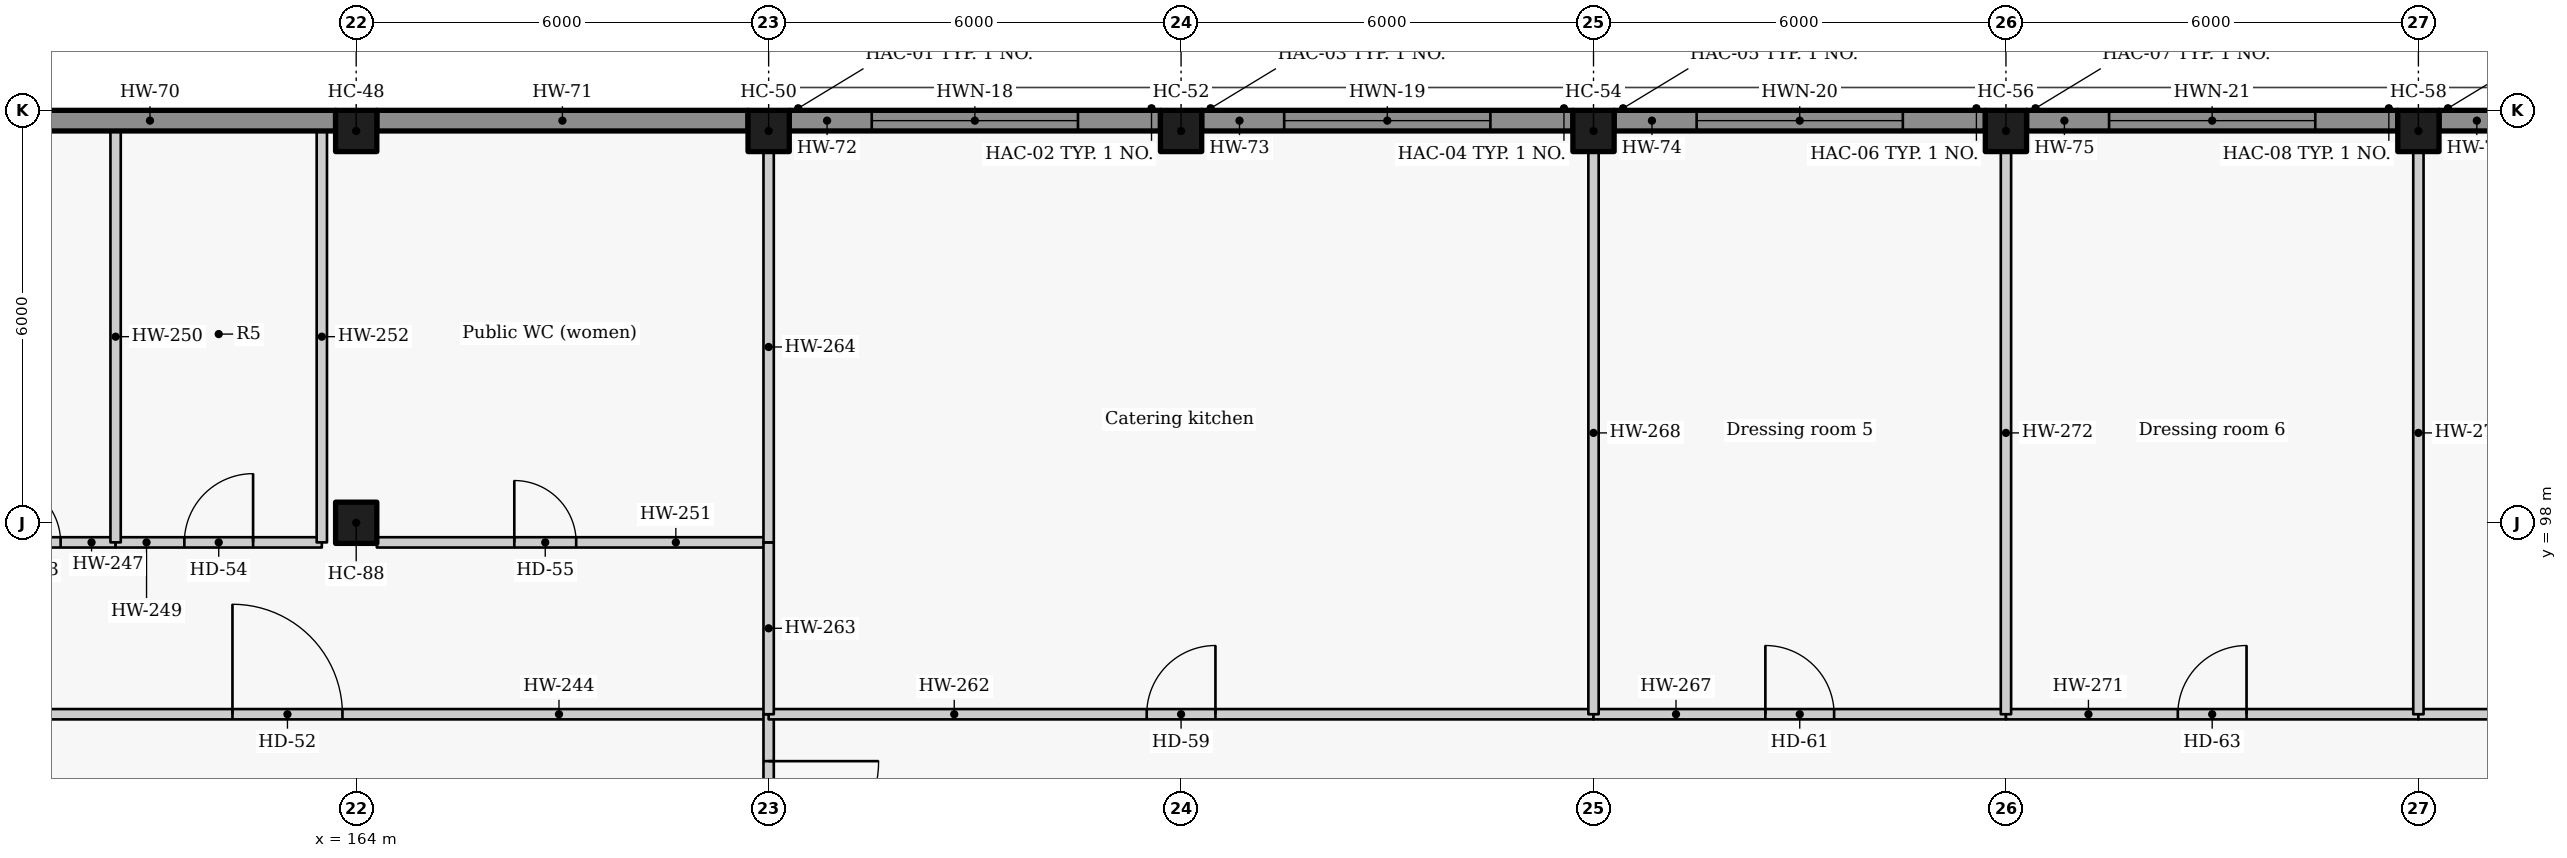
"""IFC4 building model, lengths in metres.
Left out: names, types, materials, properties, quantities, classifications, styles, units other than length and angle.
Written with IfcOpenShell. Run it as: python <this file> out.ifc"""

import sys

from ifc_helpers import new_model, si_unit, direction, frame, frame_2d, origin, origin_2d, place, context, subcontext, project, spatial, rectangle, extrude, element, fill, save


model = new_model("IFC4")
c1 = context("Model", 3, precision=1e-05, world=origin(), true_north=direction((0.0, 1.0)))
c2 = subcontext(c1, "Body", "Model", "MODEL_VIEW")
j1 = project(units=[si_unit("LENGTHUNIT", "METRE"), si_unit("PLANEANGLEUNIT", "RADIAN")], contexts=[c1])
p1 = place(None, origin())
s1 = spatial("IfcSite", under=j1, at=p1, CompositionType="ELEMENT")
p2 = place(p1, origin())
s2 = spatial("IfcBuilding", under=s1, at=p2, CompositionType="ELEMENT")
p3 = place(p2, frame((0.0, 0.0, 6.6)))
s3 = spatial("IfcBuildingStorey", under=s2, at=p3, CompositionType="ELEMENT", Elevation=6.6)
for number, where, z_axis, x_axis in (
    (1, (164.0, 103.7, 0.0), (0.0, 0.0, 1.0), (1.0, 0.0, 0.0)),
    (2, (170.0, 103.7, 0.0), (0.0, 0.0, 1.0), (1.0, 0.0, 0.0)),
    (3, (176.0, 103.7, 0.0), (0.0, 0.0, 1.0), (1.0, 0.0, 0.0)),
    (4, (182.0, 103.7, 0.0), (0.0, 0.0, 1.0), (1.0, 0.0, 0.0)),
    (5, (188.0, 103.7, 0.0), (0.0, 0.0, 1.0), (1.0, 0.0, 0.0)),
    (6, (194.0, 103.7, 0.0), (0.0, 0.0, 1.0), (1.0, 0.0, 0.0)),
    (7, (164.0, 98.0, 0.0), (0.0, 0.0, 1.0), (1.0, 0.0, 0.0)),
):
    element("IfcColumn", number, at=place(p3, frame(where, z_axis=z_axis, x_axis=x_axis)), inside=s3, PredefinedType="COLUMN", context=c2, shape_type="SweptSolid", body=[
        extrude(rectangle(XDim=0.6, YDim=0.6, at=origin_2d()), origin(), (0.0, 0.0, 1.0), 4.8),
    ])
for number, where, z_axis, x_axis in (
    (8, (158.3, 103.85, 0.0), (0.0, 0.0, 1.0), (1.0, 0.0, 0.0)),
    (9, (164.3, 103.85, 0.0), (0.0, 0.0, 1.0), (1.0, 0.0, 0.0)),
):
    element("IfcWall", number, at=place(p3, frame(where, z_axis=z_axis, x_axis=x_axis)), inside=s3, PredefinedType="SOLIDWALL", context=c2, shape_type="SweptSolid", body=[
        extrude(rectangle(XDim=5.4, YDim=0.3, at=frame_2d((2.7, 0.0))), origin(), (0.0, 0.0, 1.0), 4.8),
    ])
p4 = place(p3, frame((170.3, 103.85, 0.0), z_axis=(0.0, 0.0, 1.0), x_axis=(1.0, 0.0, 0.0)))
e10 = element("IfcWall", 10, at=p4, inside=s3, PredefinedType="SOLIDWALL", context=c2, shape_type="SweptSolid", body=[
    extrude(rectangle(XDim=5.4, YDim=0.3, at=frame_2d((2.7, 0.0))), origin(), (0.0, 0.0, 1.0), 4.8),
])
p5 = place(p4, frame((1.2, 0.0, 0.9)))
e11 = element("IfcOpeningElement", 11, at=p5, cuts=e10, PredefinedType="OPENING", context=c2, shape_type="SweptSolid", body=[
    extrude(rectangle(XDim=3.0, YDim=1.8, at=frame_2d((1.5, 0.9))), frame((0.0, 0.16, 0.0), z_axis=(0.0, -1.0, 0.0), x_axis=(1.0, 0.0, 0.0)), (0.0, 0.0, 1.0), 0.32),
])
p6 = place(p3, frame((176.3, 103.85, 0.0), z_axis=(0.0, 0.0, 1.0), x_axis=(1.0, 0.0, 0.0)))
e12 = element("IfcWall", 12, at=p6, inside=s3, PredefinedType="SOLIDWALL", context=c2, shape_type="SweptSolid", body=[
    extrude(rectangle(XDim=5.4, YDim=0.3, at=frame_2d((2.7, 0.0))), origin(), (0.0, 0.0, 1.0), 4.8),
])
p7 = place(p6, frame((1.2, 0.0, 0.9)))
e13 = element("IfcOpeningElement", 13, at=p7, cuts=e12, PredefinedType="OPENING", context=c2, shape_type="SweptSolid", body=[
    extrude(rectangle(XDim=3.0, YDim=1.8, at=frame_2d((1.5, 0.9))), frame((0.0, 0.16, 0.0), z_axis=(0.0, -1.0, 0.0), x_axis=(1.0, 0.0, 0.0)), (0.0, 0.0, 1.0), 0.32),
])
p8 = place(p3, frame((182.3, 103.85, 0.0), z_axis=(0.0, 0.0, 1.0), x_axis=(1.0, 0.0, 0.0)))
e14 = element("IfcWall", 14, at=p8, inside=s3, PredefinedType="SOLIDWALL", context=c2, shape_type="SweptSolid", body=[
    extrude(rectangle(XDim=5.4, YDim=0.3, at=frame_2d((2.7, 0.0))), origin(), (0.0, 0.0, 1.0), 4.8),
])
p9 = place(p8, frame((1.2, 0.0, 0.9)))
e15 = element("IfcOpeningElement", 15, at=p9, cuts=e14, PredefinedType="OPENING", context=c2, shape_type="SweptSolid", body=[
    extrude(rectangle(XDim=3.0, YDim=1.8, at=frame_2d((1.5, 0.9))), frame((0.0, 0.16, 0.0), z_axis=(0.0, -1.0, 0.0), x_axis=(1.0, 0.0, 0.0)), (0.0, 0.0, 1.0), 0.32),
])
p10 = place(p3, frame((188.3, 103.85, 0.0), z_axis=(0.0, 0.0, 1.0), x_axis=(1.0, 0.0, 0.0)))
e16 = element("IfcWall", 16, at=p10, inside=s3, PredefinedType="SOLIDWALL", context=c2, shape_type="SweptSolid", body=[
    extrude(rectangle(XDim=5.4, YDim=0.3, at=frame_2d((2.7, 0.0))), origin(), (0.0, 0.0, 1.0), 4.8),
])
p11 = place(p10, frame((1.2, 0.0, 0.9)))
e17 = element("IfcOpeningElement", 17, at=p11, cuts=e16, PredefinedType="OPENING", context=c2, shape_type="SweptSolid", body=[
    extrude(rectangle(XDim=3.0, YDim=1.8, at=frame_2d((1.5, 0.9))), frame((0.0, 0.16, 0.0), z_axis=(0.0, -1.0, 0.0), x_axis=(1.0, 0.0, 0.0)), (0.0, 0.0, 1.0), 0.32),
])
p12 = place(p3, frame((194.3, 103.85, 0.0), z_axis=(0.0, 0.0, 1.0), x_axis=(1.0, 0.0, 0.0)))
e18 = element("IfcWall", 18, at=p12, inside=s3, PredefinedType="SOLIDWALL", context=c2, shape_type="SweptSolid", body=[
    extrude(rectangle(XDim=5.4, YDim=0.3, at=frame_2d((2.7, 0.0))), origin(), (0.0, 0.0, 1.0), 4.8),
])
p13 = place(p12, frame((1.2, 0.0, 0.9)))
e19 = element("IfcOpeningElement", 19, at=p13, cuts=e18, PredefinedType="OPENING", context=c2, shape_type="SweptSolid", body=[
    extrude(rectangle(XDim=3.0, YDim=1.8, at=frame_2d((1.5, 0.9))), frame((0.0, 0.16, 0.0), z_axis=(0.0, -1.0, 0.0), x_axis=(1.0, 0.0, 0.0)), (0.0, 0.0, 1.0), 0.32),
])
p14 = place(p3, frame((156.175, 95.215, 0.0), z_axis=(0.0, 0.0, 1.0), x_axis=(1.0, 0.0, 0.0)))
e20 = element("IfcWall", 20, at=p14, inside=s3, PredefinedType="PARTITIONING", context=c2, shape_type="SweptSolid", body=[
    extrude(rectangle(XDim=13.825, YDim=0.15, at=frame_2d((6.913, 0.0))), origin(), (0.0, 0.0, 1.0), 4.45),
])
p15 = place(p14, frame((6.025, 0.0, 0.0)))
e21 = element("IfcOpeningElement", 21, at=p15, cuts=e20, PredefinedType="OPENING", context=c2, shape_type="SweptSolid", body=[
    extrude(rectangle(XDim=1.6, YDim=2.1, at=frame_2d((0.8, 1.05))), frame((0.0, 0.085, 0.0), z_axis=(0.0, -1.0, 0.0), x_axis=(1.0, 0.0, 0.0)), (0.0, 0.0, 1.0), 0.17),
])
p16 = place(p3, frame((158.3, 97.715, 0.0), z_axis=(0.0, 0.0, 1.0), x_axis=(1.0, 0.0, 0.0)))
e22 = element("IfcWall", 22, at=p16, inside=s3, PredefinedType="PLUMBINGWALL", context=c2, shape_type="SweptSolid", body=[
    extrude(rectangle(XDim=2.2, YDim=0.15, at=frame_2d((1.1, 0.0))), origin(), (0.0, 0.0, 1.0), 4.45),
])
p17 = place(p16, frame((0.5, 0.0, 0.0)))
e23 = element("IfcOpeningElement", 23, at=p17, cuts=e22, PredefinedType="OPENING", context=c2, shape_type="SweptSolid", body=[
    extrude(rectangle(XDim=0.9, YDim=2.1, at=frame_2d((0.45, 1.05))), frame((0.0, 0.085, 0.0), z_axis=(0.0, -1.0, 0.0), x_axis=(1.0, 0.0, 0.0)), (0.0, 0.0, 1.0), 0.17),
])
p18 = place(p3, frame((160.5, 97.715, 0.0), z_axis=(0.0, 0.0, 1.0), x_axis=(1.0, 0.0, 0.0)))
e24 = element("IfcWall", 24, at=p18, inside=s3, PredefinedType="PLUMBINGWALL", context=c2, shape_type="SweptSolid", body=[
    extrude(rectangle(XDim=3.0, YDim=0.15, at=frame_2d((1.5, 0.0))), origin(), (0.0, 0.0, 1.0), 4.45),
])
p19 = place(p18, frame((1.0, 0.0, 0.0)))
e25 = element("IfcOpeningElement", 25, at=p19, cuts=e24, PredefinedType="OPENING", context=c2, shape_type="SweptSolid", body=[
    extrude(rectangle(XDim=1.0, YDim=2.1, at=frame_2d((0.5, 1.05))), frame((0.0, 0.085, 0.0), z_axis=(0.0, -1.0, 0.0), x_axis=(1.0, 0.0, 0.0)), (0.0, 0.0, 1.0), 0.17),
])
p20 = place(p3, frame((160.5, 103.7, 0.0), z_axis=(0.0, 0.0, 1.0), x_axis=(0.0, -1.0, 0.0)))
e26 = element("IfcWall", 26, at=p20, inside=s3, PredefinedType="PLUMBINGWALL", context=c2, shape_type="SweptSolid", body=[
    extrude(rectangle(XDim=5.985, YDim=0.15, at=frame_2d((2.992, 0.0))), origin(), (0.0, 0.0, 1.0), 4.45),
])
p21 = place(p3, frame((164.3, 97.715, 0.0), z_axis=(0.0, 0.0, 1.0), x_axis=(1.0, 0.0, 0.0)))
e27 = element("IfcWall", 27, at=p21, inside=s3, PredefinedType="PLUMBINGWALL", context=c2, shape_type="SweptSolid", body=[
    extrude(rectangle(XDim=5.7, YDim=0.15, at=frame_2d((2.85, 0.0))), origin(), (0.0, 0.0, 1.0), 4.45),
])
p22 = place(p21, frame((2.0, 0.0, 0.0)))
e28 = element("IfcOpeningElement", 28, at=p22, cuts=e27, PredefinedType="OPENING", context=c2, shape_type="SweptSolid", body=[
    extrude(rectangle(XDim=0.9, YDim=2.1, at=frame_2d((0.45, 1.05))), frame((0.0, 0.085, 0.0), z_axis=(0.0, -1.0, 0.0), x_axis=(1.0, 0.0, 0.0)), (0.0, 0.0, 1.0), 0.17),
])
p23 = place(p3, frame((163.5, 103.7, 0.0), z_axis=(0.0, 0.0, 1.0), x_axis=(0.0, -1.0, 0.0)))
e29 = element("IfcWall", 29, at=p23, inside=s3, PredefinedType="PLUMBINGWALL", context=c2, shape_type="SweptSolid", body=[
    extrude(rectangle(XDim=5.985, YDim=0.15, at=frame_2d((2.992, 0.0))), origin(), (0.0, 0.0, 1.0), 4.45),
])
p24 = place(p3, frame((170.0, 95.215, 0.0), z_axis=(0.0, 0.0, 1.0), x_axis=(0.0, -1.0, 0.0)))
e30 = element("IfcWall", 30, at=p24, inside=s3, PredefinedType="PARTITIONING", context=c2, shape_type="SweptSolid", body=[
    extrude(rectangle(XDim=2.965, YDim=0.15, at=frame_2d((1.482, 0.0))), origin(), (0.0, 0.0, 1.0), 4.45),
])
p25 = place(p24, frame((0.683, 0.0, 0.0)))
e31 = element("IfcOpeningElement", 31, at=p25, cuts=e30, PredefinedType="OPENING", context=c2, shape_type="SweptSolid", body=[
    extrude(rectangle(XDim=1.6, YDim=2.1, at=frame_2d((0.8, 1.05))), frame((0.0, 0.085, 0.0), z_axis=(0.0, -1.0, 0.0), x_axis=(1.0, 0.0, 0.0)), (0.0, 0.0, 1.0), 0.17),
])
p26 = place(p3, frame((170.0, 95.215, 0.0), z_axis=(0.0, 0.0, 1.0), x_axis=(1.0, 0.0, 0.0)))
e32 = element("IfcWall", 32, at=p26, inside=s3, PredefinedType="PARTITIONING", context=c2, shape_type="SweptSolid", body=[
    extrude(rectangle(XDim=12.0, YDim=0.15, at=frame_2d((6.0, 0.0))), origin(), (0.0, 0.0, 1.0), 4.45),
])
p27 = place(p26, frame((5.5, 0.0, 0.0)))
e33 = element("IfcOpeningElement", 33, at=p27, cuts=e32, PredefinedType="OPENING", context=c2, shape_type="SweptSolid", body=[
    extrude(rectangle(XDim=1.0, YDim=2.1, at=frame_2d((0.5, 1.05))), frame((0.0, 0.085, 0.0), z_axis=(0.0, -1.0, 0.0), x_axis=(1.0, 0.0, 0.0)), (0.0, 0.0, 1.0), 0.17),
])
p28 = place(p3, frame((170.0, 97.715, 0.0), z_axis=(0.0, 0.0, 1.0), x_axis=(0.0, -1.0, 0.0)))
e34 = element("IfcWall", 34, at=p28, inside=s3, PredefinedType="PARTITIONING", context=c2, shape_type="SweptSolid", body=[
    extrude(rectangle(XDim=2.5, YDim=0.15, at=frame_2d((1.25, 0.0))), origin(), (0.0, 0.0, 1.0), 4.45),
])
p29 = place(p3, frame((170.0, 103.4, 0.0), z_axis=(0.0, 0.0, 1.0), x_axis=(0.0, -1.0, 0.0)))
e35 = element("IfcWall", 35, at=p29, inside=s3, PredefinedType="PLUMBINGWALL", context=c2, shape_type="SweptSolid", body=[
    extrude(rectangle(XDim=5.685, YDim=0.15, at=frame_2d((2.842, 0.0))), origin(), (0.0, 0.0, 1.0), 4.45),
])
p30 = place(p3, frame((182.0, 95.215, 0.0), z_axis=(0.0, 0.0, 1.0), x_axis=(1.0, 0.0, 0.0)))
e36 = element("IfcWall", 36, at=p30, inside=s3, PredefinedType="PARTITIONING", context=c2, shape_type="SweptSolid", body=[
    extrude(rectangle(XDim=6.0, YDim=0.15, at=frame_2d((3.0, 0.0))), origin(), (0.0, 0.0, 1.0), 4.45),
])
p31 = place(p30, frame((2.5, 0.0, 0.0)))
e37 = element("IfcOpeningElement", 37, at=p31, cuts=e36, PredefinedType="OPENING", context=c2, shape_type="SweptSolid", body=[
    extrude(rectangle(XDim=1.0, YDim=2.1, at=frame_2d((0.5, 1.05))), frame((0.0, 0.085, 0.0), z_axis=(0.0, -1.0, 0.0), x_axis=(1.0, 0.0, 0.0)), (0.0, 0.0, 1.0), 0.17),
])
p32 = place(p3, frame((182.0, 103.4, 0.0), z_axis=(0.0, 0.0, 1.0), x_axis=(0.0, -1.0, 0.0)))
e38 = element("IfcWall", 38, at=p32, inside=s3, PredefinedType="PARTITIONING", context=c2, shape_type="SweptSolid", body=[
    extrude(rectangle(XDim=8.185, YDim=0.15, at=frame_2d((4.092, 0.0))), origin(), (0.0, 0.0, 1.0), 4.45),
])
p33 = place(p3, frame((188.0, 95.215, 0.0), z_axis=(0.0, 0.0, 1.0), x_axis=(1.0, 0.0, 0.0)))
e39 = element("IfcWall", 39, at=p33, inside=s3, PredefinedType="PARTITIONING", context=c2, shape_type="SweptSolid", body=[
    extrude(rectangle(XDim=6.0, YDim=0.15, at=frame_2d((3.0, 0.0))), origin(), (0.0, 0.0, 1.0), 4.45),
])
p34 = place(p33, frame((2.5, 0.0, 0.0)))
e40 = element("IfcOpeningElement", 40, at=p34, cuts=e39, PredefinedType="OPENING", context=c2, shape_type="SweptSolid", body=[
    extrude(rectangle(XDim=1.0, YDim=2.1, at=frame_2d((0.5, 1.05))), frame((0.0, 0.085, 0.0), z_axis=(0.0, -1.0, 0.0), x_axis=(1.0, 0.0, 0.0)), (0.0, 0.0, 1.0), 0.17),
])
p35 = place(p3, frame((188.0, 103.4, 0.0), z_axis=(0.0, 0.0, 1.0), x_axis=(0.0, -1.0, 0.0)))
e41 = element("IfcWall", 41, at=p35, inside=s3, PredefinedType="PARTITIONING", context=c2, shape_type="SweptSolid", body=[
    extrude(rectangle(XDim=8.185, YDim=0.15, at=frame_2d((4.092, 0.0))), origin(), (0.0, 0.0, 1.0), 4.45),
])
p36 = place(p3, frame((194.0, 95.215, 0.0), z_axis=(0.0, 0.0, 1.0), x_axis=(1.0, 0.0, 0.0)))
e42 = element("IfcWall", 42, at=p36, inside=s3, PredefinedType="PARTITIONING", context=c2, shape_type="SweptSolid", body=[
    extrude(rectangle(XDim=12.0, YDim=0.15, at=frame_2d((6.0, 0.0))), origin(), (0.0, 0.0, 1.0), 4.45),
])
p37 = place(p36, frame((5.5, 0.0, 0.0)))
e43 = element("IfcOpeningElement", 43, at=p37, cuts=e42, PredefinedType="OPENING", context=c2, shape_type="SweptSolid", body=[
    extrude(rectangle(XDim=1.0, YDim=2.1, at=frame_2d((0.5, 1.05))), frame((0.0, 0.085, 0.0), z_axis=(0.0, -1.0, 0.0), x_axis=(1.0, 0.0, 0.0)), (0.0, 0.0, 1.0), 0.17),
])
p38 = place(p3, frame((194.0, 103.4, 0.0), z_axis=(0.0, 0.0, 1.0), x_axis=(0.0, -1.0, 0.0)))
e44 = element("IfcWall", 44, at=p38, inside=s3, PredefinedType="PARTITIONING", context=c2, shape_type="SweptSolid", body=[
    extrude(rectangle(XDim=8.185, YDim=0.15, at=frame_2d((4.092, 0.0))), origin(), (0.0, 0.0, 1.0), 4.45),
])
p39 = place(p5, origin())
e45 = element("IfcWindow", 45, at=p39, inside=s3, PartitioningType="SINGLE_PANEL", PredefinedType="WINDOW", context=c2, shape_type="SweptSolid", body=[
    extrude(rectangle(XDim=3.0, YDim=1.8, at=frame_2d((1.5, 0.9))), frame((0.0, 0.03, 0.0), z_axis=(0.0, -1.0, 0.0), x_axis=(1.0, 0.0, 0.0)), (0.0, 0.0, 1.0), 0.06),
])
fill(e11, e45)
p40 = place(p7, origin())
e46 = element("IfcWindow", 46, at=p40, inside=s3, PartitioningType="SINGLE_PANEL", PredefinedType="WINDOW", context=c2, shape_type="SweptSolid", body=[
    extrude(rectangle(XDim=3.0, YDim=1.8, at=frame_2d((1.5, 0.9))), frame((0.0, 0.03, 0.0), z_axis=(0.0, -1.0, 0.0), x_axis=(1.0, 0.0, 0.0)), (0.0, 0.0, 1.0), 0.06),
])
fill(e13, e46)
p41 = place(p9, origin())
e47 = element("IfcWindow", 47, at=p41, inside=s3, PartitioningType="SINGLE_PANEL", PredefinedType="WINDOW", context=c2, shape_type="SweptSolid", body=[
    extrude(rectangle(XDim=3.0, YDim=1.8, at=frame_2d((1.5, 0.9))), frame((0.0, 0.03, 0.0), z_axis=(0.0, -1.0, 0.0), x_axis=(1.0, 0.0, 0.0)), (0.0, 0.0, 1.0), 0.06),
])
fill(e15, e47)
p42 = place(p11, origin())
e48 = element("IfcWindow", 48, at=p42, inside=s3, PartitioningType="SINGLE_PANEL", PredefinedType="WINDOW", context=c2, shape_type="SweptSolid", body=[
    extrude(rectangle(XDim=3.0, YDim=1.8, at=frame_2d((1.5, 0.9))), frame((0.0, 0.03, 0.0), z_axis=(0.0, -1.0, 0.0), x_axis=(1.0, 0.0, 0.0)), (0.0, 0.0, 1.0), 0.06),
])
fill(e17, e48)
p43 = place(p15, origin())
e49 = element("IfcDoor", 49, at=p43, inside=s3, OperationType="DOUBLE_DOOR_SINGLE_SWING", PredefinedType="DOOR", context=c2, shape_type="SweptSolid", body=[
    extrude(rectangle(XDim=1.6, YDim=2.1, at=frame_2d((0.8, 1.05))), frame((0.0, 0.025, 0.0), z_axis=(0.0, -1.0, 0.0), x_axis=(1.0, 0.0, 0.0)), (0.0, 0.0, 1.0), 0.05),
])
fill(e21, e49)
p44 = place(p17, origin())
e50 = element("IfcDoor", 50, at=p44, inside=s3, OperationType="SINGLE_SWING_LEFT", PredefinedType="DOOR", context=c2, shape_type="SweptSolid", body=[
    extrude(rectangle(XDim=0.9, YDim=2.1, at=frame_2d((0.45, 1.05))), frame((0.0, 0.025, 0.0), z_axis=(0.0, -1.0, 0.0), x_axis=(1.0, 0.0, 0.0)), (0.0, 0.0, 1.0), 0.05),
])
fill(e23, e50)
p45 = place(p19, origin())
e51 = element("IfcDoor", 51, at=p45, inside=s3, OperationType="SINGLE_SWING_RIGHT", PredefinedType="DOOR", context=c2, shape_type="SweptSolid", body=[
    extrude(rectangle(XDim=1.0, YDim=2.1, at=frame_2d((0.5, 1.05))), frame((0.0, 0.025, 0.0), z_axis=(0.0, -1.0, 0.0), x_axis=(1.0, 0.0, 0.0)), (0.0, 0.0, 1.0), 0.05),
])
fill(e25, e51)
p46 = place(p22, origin())
e52 = element("IfcDoor", 52, at=p46, inside=s3, OperationType="SINGLE_SWING_LEFT", PredefinedType="DOOR", context=c2, shape_type="SweptSolid", body=[
    extrude(rectangle(XDim=0.9, YDim=2.1, at=frame_2d((0.45, 1.05))), frame((0.0, 0.025, 0.0), z_axis=(0.0, -1.0, 0.0), x_axis=(1.0, 0.0, 0.0)), (0.0, 0.0, 1.0), 0.05),
])
fill(e28, e52)
p47 = place(p25, origin())
e53 = element("IfcDoor", 53, at=p47, inside=s3, OperationType="DOUBLE_DOOR_SINGLE_SWING", PredefinedType="DOOR", context=c2, shape_type="SweptSolid", body=[
    extrude(rectangle(XDim=1.6, YDim=2.1, at=frame_2d((0.8, 1.05))), frame((0.0, 0.025, 0.0), z_axis=(0.0, -1.0, 0.0), x_axis=(1.0, 0.0, 0.0)), (0.0, 0.0, 1.0), 0.05),
])
fill(e31, e53)
p48 = place(p27, origin())
e54 = element("IfcDoor", 54, at=p48, inside=s3, OperationType="SINGLE_SWING_RIGHT", PredefinedType="DOOR", context=c2, shape_type="SweptSolid", body=[
    extrude(rectangle(XDim=1.0, YDim=2.1, at=frame_2d((0.5, 1.05))), frame((0.0, 0.025, 0.0), z_axis=(0.0, -1.0, 0.0), x_axis=(1.0, 0.0, 0.0)), (0.0, 0.0, 1.0), 0.05),
])
fill(e33, e54)
p49 = place(p31, origin())
e55 = element("IfcDoor", 55, at=p49, inside=s3, OperationType="SINGLE_SWING_LEFT", PredefinedType="DOOR", context=c2, shape_type="SweptSolid", body=[
    extrude(rectangle(XDim=1.0, YDim=2.1, at=frame_2d((0.5, 1.05))), frame((0.0, 0.025, 0.0), z_axis=(0.0, -1.0, 0.0), x_axis=(1.0, 0.0, 0.0)), (0.0, 0.0, 1.0), 0.05),
])
fill(e37, e55)
p50 = place(p34, origin())
e56 = element("IfcDoor", 56, at=p50, inside=s3, OperationType="SINGLE_SWING_RIGHT", PredefinedType="DOOR", context=c2, shape_type="SweptSolid", body=[
    extrude(rectangle(XDim=1.0, YDim=2.1, at=frame_2d((0.5, 1.05))), frame((0.0, 0.025, 0.0), z_axis=(0.0, -1.0, 0.0), x_axis=(1.0, 0.0, 0.0)), (0.0, 0.0, 1.0), 0.05),
])
fill(e40, e56)
save(model, sys.argv[1])
